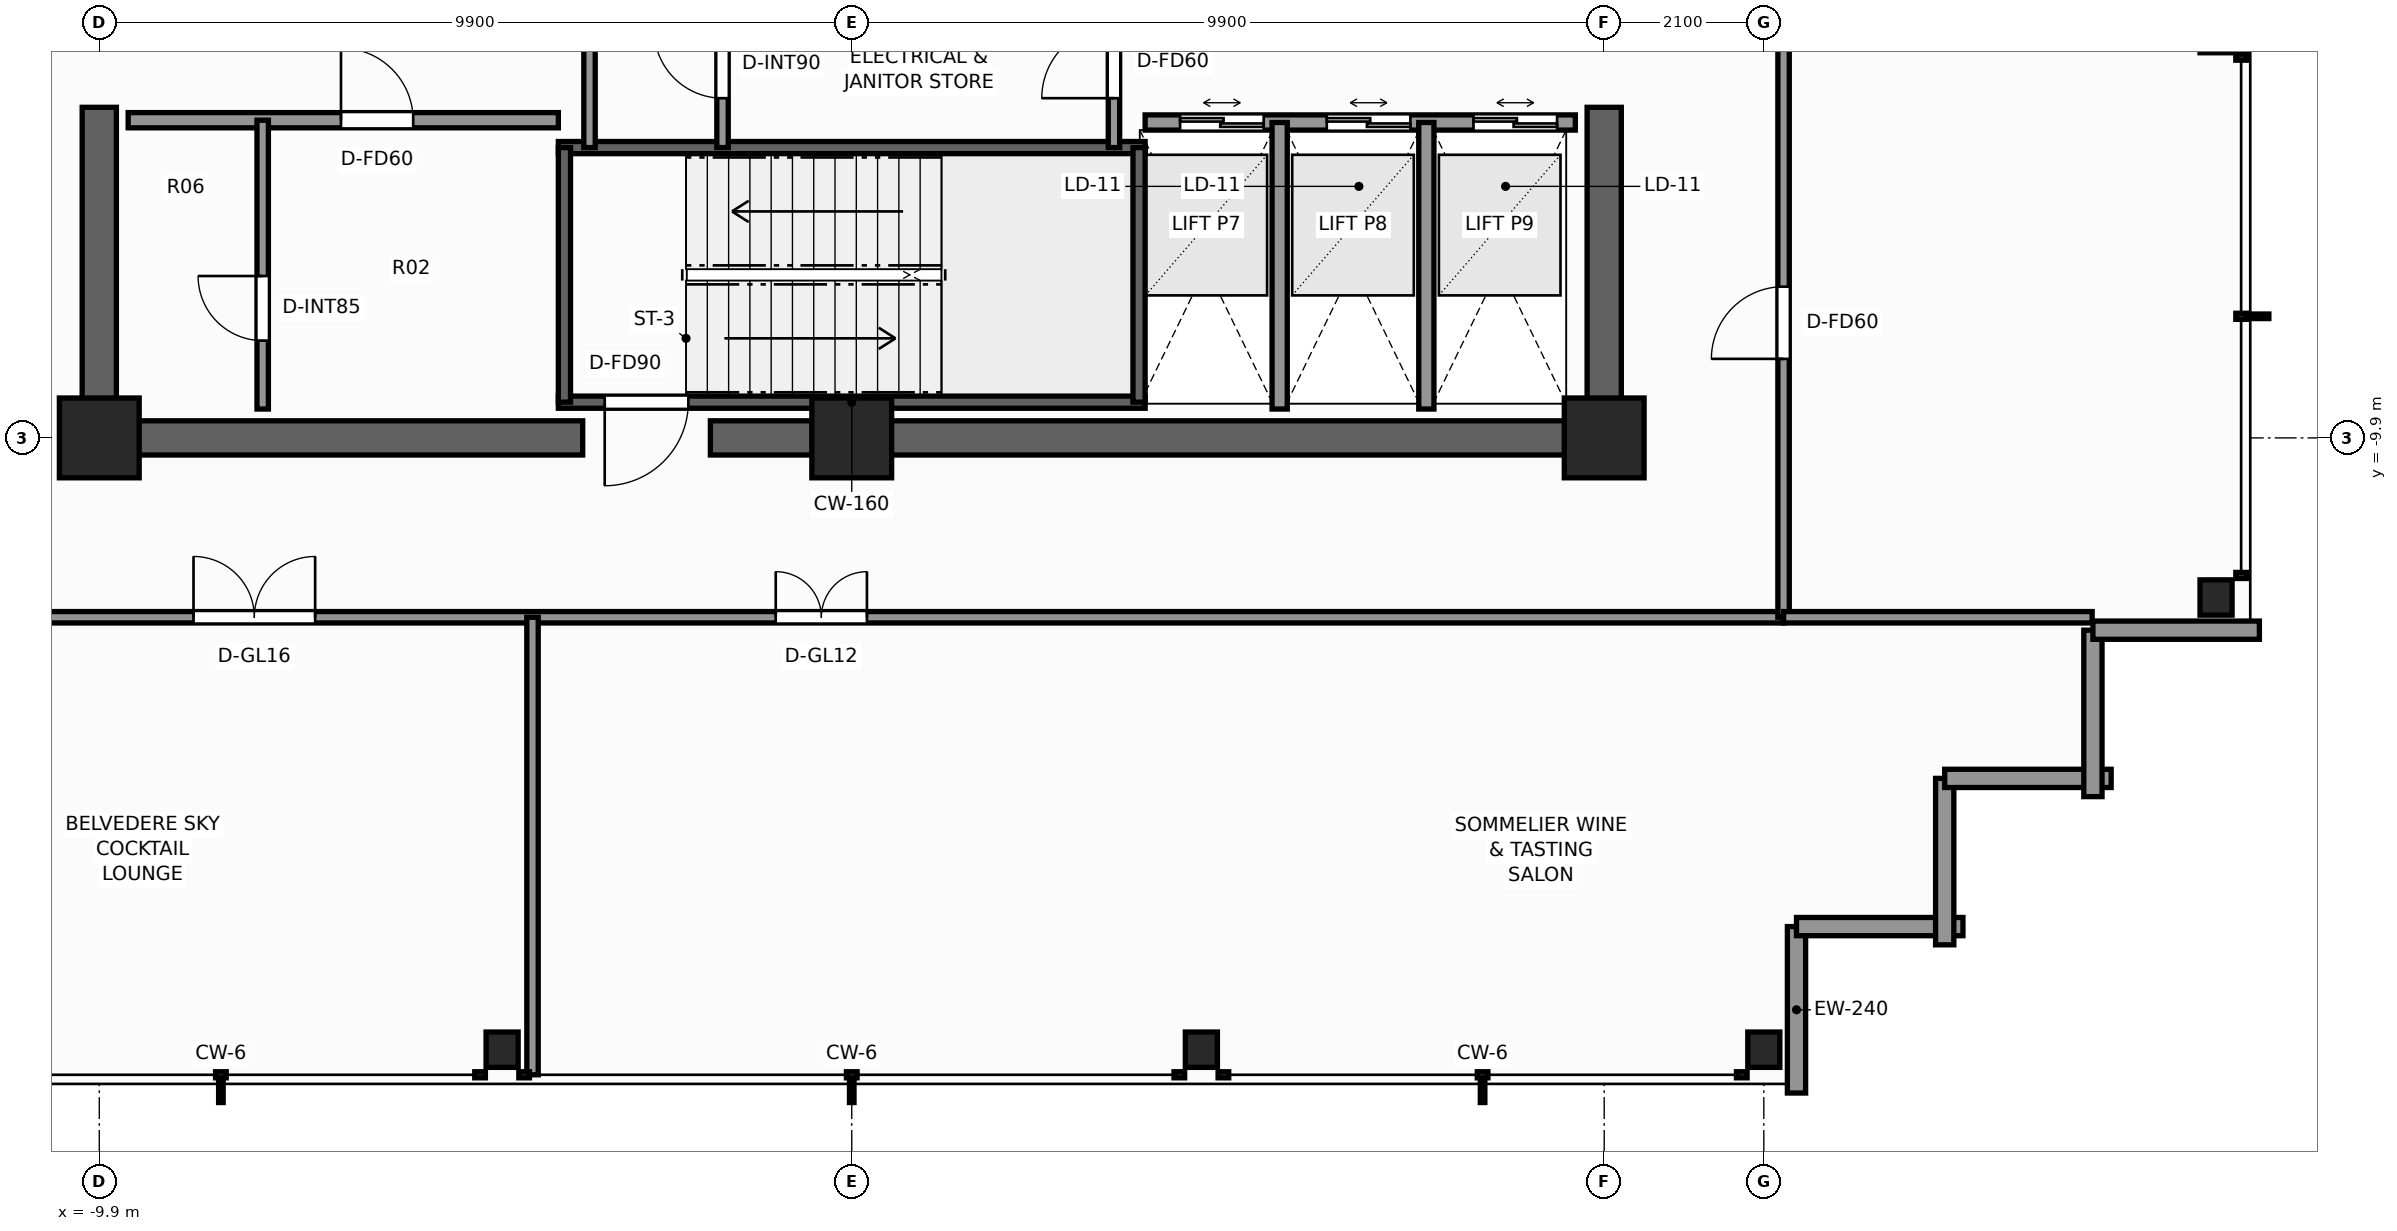
"""IFC4 building model, lengths in metres.
Left out: names, types, materials, properties, quantities, classifications, styles, units other than length and angle.
Written with IfcOpenShell. Run it as: python <this file> out.ifc"""

import sys

from ifc_helpers import new_model, si_unit, direction, frame, frame_2d, origin, origin_2d, place, context, subcontext, project, spatial, rectangle, i_section, extrude, element, fill, save


model = new_model("IFC4")
c1 = context("Model", 3, precision=1e-05, world=origin(), true_north=direction((0.0, 1.0)))
c2 = subcontext(c1, "Body", "Model", "MODEL_VIEW")
j1 = project(units=[si_unit("LENGTHUNIT", "METRE"), si_unit("PLANEANGLEUNIT", "RADIAN")], contexts=[c1])
p1 = place(None, origin())
s1 = spatial("IfcSite", under=j1, at=p1, CompositionType="ELEMENT")
p2 = place(p1, origin())
s2 = spatial("IfcBuilding", under=s1, at=p2, CompositionType="ELEMENT")
p3 = place(p2, frame((0.0, 0.0, 258.4)))
s3 = spatial("IfcBuildingStorey", under=s2, at=p3, CompositionType="ELEMENT", Elevation=258.4)
p4 = place(p3, frame((10.125, -9.9, 0.0), z_axis=(0.0, 0.0, 1.0), x_axis=(-1.0, 0.0, 0.0)))
e1 = element("IfcWall", 1, at=p4, inside=s3, PredefinedType="SHEAR", context=c2, shape_type="SweptSolid", body=[
    extrude(rectangle(XDim=11.985, YDim=0.45, at=frame_2d((5.993, 0.0))), origin(), (0.0, 0.0, 1.0), 4.4),
])
p5 = place(p3, frame((-3.54, -9.9, 0.0), z_axis=(0.0, 0.0, 1.0), x_axis=(-1.0, 0.0, 0.0)))
e2 = element("IfcWall", 2, at=p5, inside=s3, PredefinedType="SHEAR", context=c2, shape_type="SweptSolid", body=[
    extrude(rectangle(XDim=6.585, YDim=0.45, at=frame_2d((3.292, 0.0))), origin(), (0.0, 0.0, 1.0), 4.4),
])
for number, where, z_axis, x_axis in (
    (3, (-9.9, -9.675, 0.0), (0.0, 0.0, 1.0), (0.0, 1.0, 0.0)),
    (4, (9.9, -9.675, 0.0), (0.0, 0.0, 1.0), (0.0, 1.0, 0.0)),
):
    element("IfcWall", number, at=place(p3, frame(where, z_axis=z_axis, x_axis=x_axis)), inside=s3, PredefinedType="SHEAR", context=c2, shape_type="SweptSolid", body=[
        extrude(rectangle(XDim=4.125, YDim=0.45, at=frame_2d((2.062, 0.0))), origin(), (0.0, 0.0, 1.0), 4.4),
    ])
for number, where, z_axis, x_axis in (
    (5, (-9.9, -9.9, 0.0), (0.0, 0.0, 1.0), (1.0, 0.0, 0.0)),
    (6, (9.9, -9.9, 0.0), (0.0, 0.0, 1.0), (1.0, 0.0, 0.0)),
    (7, (0.0, -9.9, 0.0), (0.0, 0.0, 1.0), (1.0, 0.0, 0.0)),
):
    element("IfcColumn", number, at=place(p3, frame(where, z_axis=z_axis, x_axis=x_axis)), inside=s3, PredefinedType="COLUMN", context=c2, shape_type="SweptSolid", body=[
        extrude(rectangle(XDim=1.05, YDim=1.05, at=origin_2d()), origin(), (0.0, 0.0, 1.0), 4.4),
    ])
for number, where, z_axis, x_axis in (
    (8, (-4.6, -17.95, 0.0), (0.0, 0.0, 1.0), (1.0, 0.0, 0.0)),
    (9, (4.6, -17.95, 0.0), (0.0, 0.0, 1.0), (1.0, 0.0, 0.0)),
    (10, (12.0, -17.95, 0.0), (0.0, 0.0, 1.0), (1.0, 0.0, 0.0)),
    (11, (17.95, -12.0, 0.0), (0.0, 0.0, 1.0), (1.0, 0.0, 0.0)),
    (12, (17.95, -4.6, 0.0), (0.0, 0.0, 1.0), (1.0, 0.0, 0.0)),
):
    element("IfcColumn", number, at=place(p3, frame(where, z_axis=z_axis, x_axis=x_axis)), inside=s3, PredefinedType="COLUMN", context=c2, shape_type="SweptSolid", body=[
        extrude(i_section(OverallWidth=0.422, OverallDepth=0.465, WebThickness=0.045, FlangeThickness=0.073, FilletRadius=0.025, at=origin_2d()), origin(), (0.0, 0.0, 1.0), 4.4),
    ])
p6 = place(p3, frame((12.43, -16.33, 0.0), z_axis=(0.0, 0.0, 1.0), x_axis=(0.0, -1.0, 0.0)))
e13 = element("IfcWall", 13, at=p6, inside=s3, PredefinedType="STANDARD", context=c2, shape_type="SweptSolid", body=[
    extrude(rectangle(XDim=2.19, YDim=0.24, at=frame_2d((1.095, 0.0))), origin(), (0.0, 0.0, 1.0), 3.503),
])
for number, where, z_axis, x_axis in (
    (14, (14.62, -16.33, 0.0), (0.0, 0.0, 1.0), (-1.0, 0.0, 0.0)),
    (15, (14.38, -14.38, 0.0), (0.0, 0.0, 1.0), (0.0, -1.0, 0.0)),
    (16, (16.57, -14.38, 0.0), (0.0, 0.0, 1.0), (-1.0, 0.0, 0.0)),
    (17, (16.33, -12.43, 0.0), (0.0, 0.0, 1.0), (0.0, -1.0, 0.0)),
):
    element("IfcWall", number, at=place(p3, frame(where, z_axis=z_axis, x_axis=x_axis)), inside=s3, PredefinedType="STANDARD", context=c2, shape_type="SweptSolid", body=[
        extrude(rectangle(XDim=2.19, YDim=0.24, at=frame_2d((1.095, 0.0))), origin(), (0.0, 0.0, 1.0), 3.503),
    ])
p7 = place(p3, frame((18.52, -12.43, 0.0), z_axis=(0.0, 0.0, 1.0), x_axis=(-1.0, 0.0, 0.0)))
e18 = element("IfcWall", 18, at=p7, inside=s3, PredefinedType="STANDARD", context=c2, shape_type="SweptSolid", body=[
    extrude(rectangle(XDim=2.19, YDim=0.24, at=frame_2d((1.095, 0.0))), origin(), (0.0, 0.0, 1.0), 3.503),
])
p8 = place(p3, frame((3.86, -9.43, 0.0), z_axis=(0.0, 0.0, 1.0), x_axis=(-1.0, 0.0, 0.0)))
e19 = element("IfcWall", 19, at=p8, inside=s3, PredefinedType="SHEAR", context=c2, shape_type="SweptSolid", body=[
    extrude(rectangle(XDim=7.72, YDim=0.16, at=frame_2d((3.86, 0.0))), origin(), (0.0, 0.0, 1.0), 4.4),
])
p9 = place(p8, frame((6.01, 0.0, 0.0)))
e20 = element("IfcOpeningElement", 20, at=p9, cuts=e19, PredefinedType="OPENING", context=c2, shape_type="SweptSolid", body=[
    extrude(rectangle(XDim=1.1, YDim=2.2, at=frame_2d((0.55, 1.1))), frame((0.0, 0.09, 0.0), z_axis=(0.0, -1.0, 0.0), x_axis=(1.0, 0.0, 0.0)), (0.0, 0.0, 1.0), 0.18),
])
p10 = place(p3, frame((-3.86, -6.08, 0.0), z_axis=(0.0, 0.0, 1.0), x_axis=(1.0, 0.0, 0.0)))
e21 = element("IfcWall", 21, at=p10, inside=s3, PredefinedType="SHEAR", context=c2, shape_type="SweptSolid", body=[
    extrude(rectangle(XDim=7.72, YDim=0.16, at=frame_2d((3.86, 0.0))), origin(), (0.0, 0.0, 1.0), 4.4),
])
for number, where, z_axis, x_axis in (
    (22, (-3.78, -9.43, 0.0), (0.0, 0.0, 1.0), (0.0, 1.0, 0.0)),
    (23, (3.78, -9.43, 0.0), (0.0, 0.0, 1.0), (0.0, 1.0, 0.0)),
):
    element("IfcWall", number, at=place(p3, frame(where, z_axis=z_axis, x_axis=x_axis)), inside=s3, PredefinedType="SHEAR", context=c2, shape_type="SweptSolid", body=[
        extrude(rectangle(XDim=3.35, YDim=0.16, at=frame_2d((1.675, 0.0))), origin(), (0.0, 0.0, 1.0), 4.4),
    ])
p11 = place(p3, frame((-9.52, -5.72, 0.0), z_axis=(0.0, 0.0, 1.0), x_axis=(1.0, 0.0, 0.0)))
e24 = element("IfcWall", 24, at=p11, inside=s3, PredefinedType="SOLIDWALL", context=c2, shape_type="SweptSolid", body=[
    extrude(rectangle(XDim=5.66, YDim=0.2, at=frame_2d((2.83, 0.0))), origin(), (0.0, 0.0, 1.0), 4.12),
])
p12 = place(p11, frame((2.8, 0.0, 0.0)))
e25 = element("IfcOpeningElement", 25, at=p12, cuts=e24, PredefinedType="OPENING", context=c2, shape_type="SweptSolid", body=[
    extrude(rectangle(XDim=0.95, YDim=2.06, at=frame_2d((0.475, 1.03))), frame((0.0, 0.11, 0.0), z_axis=(0.0, -1.0, 0.0), x_axis=(1.0, 0.0, 0.0)), (0.0, 0.0, 1.0), 0.22),
])
p13 = place(p3, frame((-7.75, -9.52, 0.0), z_axis=(0.0, 0.0, 1.0), x_axis=(0.0, 1.0, 0.0)))
e26 = element("IfcWall", 26, at=p13, inside=s3, PredefinedType="PARTITIONING", context=c2, shape_type="SweptSolid", body=[
    extrude(rectangle(XDim=3.8, YDim=0.15, at=frame_2d((1.9, 0.0))), origin(), (0.0, 0.0, 1.0), 4.12),
])
p14 = place(p13, frame((0.9, 0.0, 0.0)))
e27 = element("IfcOpeningElement", 27, at=p14, cuts=e26, PredefinedType="OPENING", context=c2, shape_type="SweptSolid", body=[
    extrude(rectangle(XDim=0.85, YDim=2.03, at=frame_2d((0.425, 1.015))), frame((0.0, 0.085, 0.0), z_axis=(0.0, -1.0, 0.0), x_axis=(1.0, 0.0, 0.0)), (0.0, 0.0, 1.0), 0.17),
])
p15 = place(p3, frame((3.86, -5.75, 0.0), z_axis=(0.0, 0.0, 1.0), x_axis=(1.0, 0.0, 0.0)))
e28 = element("IfcWall", 28, at=p15, inside=s3, PredefinedType="SOLIDWALL", context=c2, shape_type="SweptSolid", body=[
    extrude(rectangle(XDim=5.66, YDim=0.2, at=frame_2d((2.83, 0.0))), origin(), (0.0, 0.0, 1.0), 4.12),
])
p16 = place(p15, frame((0.46, 0.0, 0.0)))
e29 = element("IfcOpeningElement", 29, at=p16, cuts=e28, PredefinedType="OPENING", context=c2, shape_type="SweptSolid", body=[
    extrude(rectangle(XDim=1.1, YDim=2.2, at=frame_2d((0.55, 1.1))), frame((0.0, 0.11, 0.0), z_axis=(0.0, -1.0, 0.0), x_axis=(1.0, 0.0, 0.0)), (0.0, 0.0, 1.0), 0.22),
])
p17 = place(p15, frame((2.39, 0.0, 0.0)))
e30 = element("IfcOpeningElement", 30, at=p17, cuts=e28, PredefinedType="OPENING", context=c2, shape_type="SweptSolid", body=[
    extrude(rectangle(XDim=1.1, YDim=2.2, at=frame_2d((0.55, 1.1))), frame((0.0, 0.11, 0.0), z_axis=(0.0, -1.0, 0.0), x_axis=(1.0, 0.0, 0.0)), (0.0, 0.0, 1.0), 0.22),
])
p18 = place(p15, frame((4.32, 0.0, 0.0)))
e31 = element("IfcOpeningElement", 31, at=p18, cuts=e28, PredefinedType="OPENING", context=c2, shape_type="SweptSolid", body=[
    extrude(rectangle(XDim=1.1, YDim=2.2, at=frame_2d((0.55, 1.1))), frame((0.0, 0.11, 0.0), z_axis=(0.0, -1.0, 0.0), x_axis=(1.0, 0.0, 0.0)), (0.0, 0.0, 1.0), 0.22),
])
for number, where, z_axis, x_axis in (
    (32, (5.63, -9.52, 0.0), (0.0, 0.0, 1.0), (0.0, 1.0, 0.0)),
    (33, (7.56, -9.52, 0.0), (0.0, 0.0, 1.0), (0.0, 1.0, 0.0)),
):
    element("IfcWall", number, at=place(p3, frame(where, z_axis=z_axis, x_axis=x_axis)), inside=s3, PredefinedType="SOLIDWALL", context=c2, shape_type="SweptSolid", body=[
        extrude(rectangle(XDim=3.77, YDim=0.2, at=frame_2d((1.885, 0.0))), origin(), (0.0, 0.0, 1.0), 4.12),
    ])
p19 = place(p3, frame((3.45, -6.08, 0.0), z_axis=(0.0, 0.0, 1.0), x_axis=(0.0, 1.0, 0.0)))
e34 = element("IfcWall", 34, at=p19, inside=s3, PredefinedType="PARTITIONING", context=c2, shape_type="SweptSolid", body=[
    extrude(rectangle(XDim=2.36, YDim=0.15, at=frame_2d((1.18, 0.0))), origin(), (0.0, 0.0, 1.0), 4.12),
])
p20 = place(p19, frame((0.65, 0.0, 0.0)))
e35 = element("IfcOpeningElement", 35, at=p20, cuts=e34, PredefinedType="OPENING", context=c2, shape_type="SweptSolid", body=[
    extrude(rectangle(XDim=0.95, YDim=2.06, at=frame_2d((0.475, 1.03))), frame((0.0, 0.085, 0.0), z_axis=(0.0, -1.0, 0.0), x_axis=(1.0, 0.0, 0.0)), (0.0, 0.0, 1.0), 0.17),
])
p21 = place(p3, frame((-3.45, -6.08, 0.0), z_axis=(0.0, 0.0, 1.0), x_axis=(0.0, 1.0, 0.0)))
e36 = element("IfcWall", 36, at=p21, inside=s3, PredefinedType="PARTITIONING", context=c2, shape_type="SweptSolid", body=[
    extrude(rectangle(XDim=2.36, YDim=0.15, at=frame_2d((1.18, 0.0))), origin(), (0.0, 0.0, 1.0), 4.12),
])
p22 = place(p3, frame((-1.7, -6.08, 0.0), z_axis=(0.0, 0.0, 1.0), x_axis=(0.0, 1.0, 0.0)))
e37 = element("IfcWall", 37, at=p22, inside=s3, PredefinedType="PARTITIONING", context=c2, shape_type="SweptSolid", body=[
    extrude(rectangle(XDim=2.36, YDim=0.15, at=frame_2d((1.18, 0.0))), origin(), (0.0, 0.0, 1.0), 4.12),
])
p23 = place(p22, frame((0.65, 0.0, 0.0)))
e38 = element("IfcOpeningElement", 38, at=p23, cuts=e37, PredefinedType="OPENING", context=c2, shape_type="SweptSolid", body=[
    extrude(rectangle(XDim=0.9, YDim=2.06, at=frame_2d((0.45, 1.03))), frame((0.0, 0.085, 0.0), z_axis=(0.0, -1.0, 0.0), x_axis=(1.0, 0.0, 0.0)), (0.0, 0.0, 1.0), 0.17),
])
p24 = place(p3, frame((-12.26, -12.26, 0.0), z_axis=(0.0, 0.0, 1.0), x_axis=(1.0, 0.0, 0.0)))
e39 = element("IfcWall", 39, at=p24, inside=s3, PredefinedType="PARTITIONING", context=c2, shape_type="SweptSolid", body=[
    extrude(rectangle(XDim=24.52, YDim=0.15, at=frame_2d((12.26, 0.0))), origin(), (0.0, 0.0, 1.0), 3.409),
])
p25 = place(p24, frame((3.6, 0.0, 0.0)))
e40 = element("IfcOpeningElement", 40, at=p25, cuts=e39, PredefinedType="OPENING", context=c2, shape_type="SweptSolid", body=[
    extrude(rectangle(XDim=1.6, YDim=2.3, at=frame_2d((0.8, 1.15))), frame((0.0, 0.085, 0.0), z_axis=(0.0, -1.0, 0.0), x_axis=(1.0, 0.0, 0.0)), (0.0, 0.0, 1.0), 0.17),
])
p26 = place(p24, frame((11.26, 0.0, 0.0)))
e41 = element("IfcOpeningElement", 41, at=p26, cuts=e39, PredefinedType="OPENING", context=c2, shape_type="SweptSolid", body=[
    extrude(rectangle(XDim=1.2, YDim=2.2, at=frame_2d((0.6, 1.1))), frame((0.0, 0.085, 0.0), z_axis=(0.0, -1.0, 0.0), x_axis=(1.0, 0.0, 0.0)), (0.0, 0.0, 1.0), 0.17),
])
p27 = place(p3, frame((12.26, -12.26, 0.0), z_axis=(0.0, 0.0, 1.0), x_axis=(0.0, 1.0, 0.0)))
e42 = element("IfcWall", 42, at=p27, inside=s3, PredefinedType="PARTITIONING", context=c2, shape_type="SweptSolid", body=[
    extrude(rectangle(XDim=24.52, YDim=0.15, at=frame_2d((12.26, 0.0))), origin(), (0.0, 0.0, 1.0), 3.409),
])
p28 = place(p27, frame((3.4, 0.0, 0.0)))
e43 = element("IfcOpeningElement", 43, at=p28, cuts=e42, PredefinedType="OPENING", context=c2, shape_type="SweptSolid", body=[
    extrude(rectangle(XDim=0.95, YDim=2.06, at=frame_2d((0.475, 1.03))), frame((0.0, 0.085, 0.0), z_axis=(0.0, -1.0, 0.0), x_axis=(1.0, 0.0, 0.0)), (0.0, 0.0, 1.0), 0.17),
])
p29 = place(p27, frame((20.22, 0.0, 0.0)))
e44 = element("IfcOpeningElement", 44, at=p29, cuts=e42, PredefinedType="OPENING", context=c2, shape_type="SweptSolid", body=[
    extrude(rectangle(XDim=0.95, YDim=2.06, at=frame_2d((0.475, 1.03))), frame((0.0, 0.085, 0.0), z_axis=(0.0, -1.0, 0.0), x_axis=(1.0, 0.0, 0.0)), (0.0, 0.0, 1.0), 0.17),
])
p30 = place(p3, frame((12.26, -12.26, 0.0), z_axis=(0.0, 0.0, 1.0), x_axis=(1.0, 0.0, 0.0)))
e45 = element("IfcWall", 45, at=p30, inside=s3, PredefinedType="PARTITIONING", context=c2, shape_type="SweptSolid", body=[
    extrude(rectangle(XDim=4.06, YDim=0.15, at=frame_2d((2.03, 0.0))), origin(), (0.0, 0.0, 1.0), 4.12),
])
p31 = place(p3, frame((-4.2, -18.28, 0.0), z_axis=(0.0, 0.0, 1.0), x_axis=(0.0, 1.0, 0.0)))
e46 = element("IfcWall", 46, at=p31, inside=s3, PredefinedType="PARTITIONING", context=c2, shape_type="SweptSolid", body=[
    extrude(rectangle(XDim=6.02, YDim=0.15, at=frame_2d((3.01, 0.0))), origin(), (0.0, 0.0, 1.0), 3.493),
])
p32 = place(p9, origin())
e47 = element("IfcDoor", 47, at=p32, inside=s3, OperationType="SINGLE_SWING_RIGHT", PredefinedType="DOOR", context=c2, shape_type="SweptSolid", body=[
    extrude(rectangle(XDim=1.1, YDim=2.2, at=frame_2d((0.55, 1.1))), frame((0.0, 0.025, 0.0), z_axis=(0.0, -1.0, 0.0), x_axis=(1.0, 0.0, 0.0)), (0.0, 0.0, 1.0), 0.05),
])
fill(e20, e47)
p33 = place(p12, origin())
e48 = element("IfcDoor", 48, at=p33, inside=s3, OperationType="SINGLE_SWING_LEFT", PredefinedType="DOOR", context=c2, shape_type="SweptSolid", body=[
    extrude(rectangle(XDim=0.95, YDim=2.06, at=frame_2d((0.475, 1.03))), frame((0.0, 0.025, 0.0), z_axis=(0.0, -1.0, 0.0), x_axis=(1.0, 0.0, 0.0)), (0.0, 0.0, 1.0), 0.05),
])
fill(e25, e48)
p34 = place(p14, origin())
e49 = element("IfcDoor", 49, at=p34, inside=s3, OperationType="SINGLE_SWING_RIGHT", PredefinedType="DOOR", context=c2, shape_type="SweptSolid", body=[
    extrude(rectangle(XDim=0.85, YDim=2.03, at=frame_2d((0.425, 1.015))), frame((0.0, 0.025, 0.0), z_axis=(0.0, -1.0, 0.0), x_axis=(1.0, 0.0, 0.0)), (0.0, 0.0, 1.0), 0.05),
])
fill(e27, e49)
p35 = place(p16, origin())
e50 = element("IfcDoor", 50, at=p35, inside=s3, OperationType="DOUBLE_DOOR_SLIDING", PredefinedType="DOOR", context=c2, shape_type="SweptSolid", body=[
    extrude(rectangle(XDim=1.1, YDim=2.2, at=frame_2d((0.55, 1.1))), frame((0.0, 0.025, 0.0), z_axis=(0.0, -1.0, 0.0), x_axis=(1.0, 0.0, 0.0)), (0.0, 0.0, 1.0), 0.05),
])
fill(e29, e50)
p36 = place(p17, origin())
e51 = element("IfcDoor", 51, at=p36, inside=s3, OperationType="DOUBLE_DOOR_SLIDING", PredefinedType="DOOR", context=c2, shape_type="SweptSolid", body=[
    extrude(rectangle(XDim=1.1, YDim=2.2, at=frame_2d((0.55, 1.1))), frame((0.0, 0.025, 0.0), z_axis=(0.0, -1.0, 0.0), x_axis=(1.0, 0.0, 0.0)), (0.0, 0.0, 1.0), 0.05),
])
fill(e30, e51)
p37 = place(p18, origin())
e52 = element("IfcDoor", 52, at=p37, inside=s3, OperationType="DOUBLE_DOOR_SLIDING", PredefinedType="DOOR", context=c2, shape_type="SweptSolid", body=[
    extrude(rectangle(XDim=1.1, YDim=2.2, at=frame_2d((0.55, 1.1))), frame((0.0, 0.025, 0.0), z_axis=(0.0, -1.0, 0.0), x_axis=(1.0, 0.0, 0.0)), (0.0, 0.0, 1.0), 0.05),
])
fill(e31, e52)
p38 = place(p20, origin())
e53 = element("IfcDoor", 53, at=p38, inside=s3, OperationType="SINGLE_SWING_LEFT", PredefinedType="DOOR", context=c2, shape_type="SweptSolid", body=[
    extrude(rectangle(XDim=0.95, YDim=2.06, at=frame_2d((0.475, 1.03))), frame((0.0, 0.025, 0.0), z_axis=(0.0, -1.0, 0.0), x_axis=(1.0, 0.0, 0.0)), (0.0, 0.0, 1.0), 0.05),
])
fill(e35, e53)
p39 = place(p23, origin())
e54 = element("IfcDoor", 54, at=p39, inside=s3, OperationType="SINGLE_SWING_RIGHT", PredefinedType="DOOR", context=c2, shape_type="SweptSolid", body=[
    extrude(rectangle(XDim=0.9, YDim=2.06, at=frame_2d((0.45, 1.03))), frame((0.0, 0.025, 0.0), z_axis=(0.0, -1.0, 0.0), x_axis=(1.0, 0.0, 0.0)), (0.0, 0.0, 1.0), 0.05),
])
fill(e38, e54)
p40 = place(p25, origin())
e55 = element("IfcDoor", 55, at=p40, inside=s3, OperationType="DOUBLE_DOOR_SINGLE_SWING", PredefinedType="DOOR", context=c2, shape_type="SweptSolid", body=[
    extrude(rectangle(XDim=1.6, YDim=2.3, at=frame_2d((0.8, 1.15))), frame((0.0, 0.025, 0.0), z_axis=(0.0, -1.0, 0.0), x_axis=(1.0, 0.0, 0.0)), (0.0, 0.0, 1.0), 0.05),
])
fill(e40, e55)
p41 = place(p26, origin())
e56 = element("IfcDoor", 56, at=p41, inside=s3, OperationType="DOUBLE_DOOR_SINGLE_SWING", PredefinedType="DOOR", context=c2, shape_type="SweptSolid", body=[
    extrude(rectangle(XDim=1.2, YDim=2.2, at=frame_2d((0.6, 1.1))), frame((0.0, 0.025, 0.0), z_axis=(0.0, -1.0, 0.0), x_axis=(1.0, 0.0, 0.0)), (0.0, 0.0, 1.0), 0.05),
])
fill(e41, e56)
p42 = place(p28, origin())
e57 = element("IfcDoor", 57, at=p42, inside=s3, OperationType="SINGLE_SWING_LEFT", PredefinedType="DOOR", context=c2, shape_type="SweptSolid", body=[
    extrude(rectangle(XDim=0.95, YDim=2.06, at=frame_2d((0.475, 1.03))), frame((0.0, 0.025, 0.0), z_axis=(0.0, -1.0, 0.0), x_axis=(1.0, 0.0, 0.0)), (0.0, 0.0, 1.0), 0.05),
])
fill(e43, e57)
save(model, sys.argv[1])
